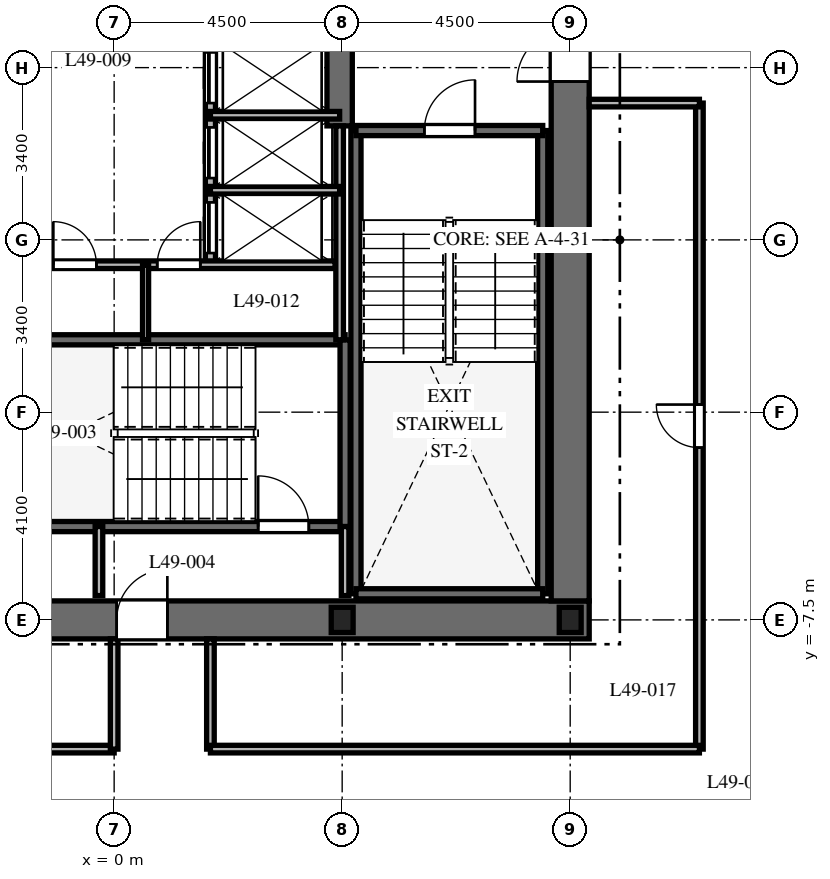
"""IFC4 building model, lengths in metres.
Left out: names, types, materials, properties, quantities, classifications, styles, units other than length and angle.
Written with IfcOpenShell. Run it as: python <this file> out.ifc"""

import sys

from ifc_helpers import new_model, si_unit, direction, frame, frame_2d, origin, origin_2d, place, context, subcontext, project, spatial, rectangle, i_section, extrude, element, fill, save


model = new_model("IFC4")
c1 = context("Model", 3, precision=1e-05, world=origin(), true_north=direction((0.0, 1.0)))
c2 = subcontext(c1, "Body", "Model", "MODEL_VIEW")
j1 = project(units=[si_unit("LENGTHUNIT", "METRE"), si_unit("PLANEANGLEUNIT", "RADIAN")], contexts=[c1])
p1 = place(None, origin())
s1 = spatial("IfcSite", under=j1, at=p1, CompositionType="ELEMENT")
p2 = place(p1, origin())
s2 = spatial("IfcBuilding", under=s1, at=p2, CompositionType="ELEMENT")
p3 = place(p2, frame((0.0, 0.0, 197.8)))
s3 = spatial("IfcBuildingStorey", under=s2, at=p3, CompositionType="ELEMENT", Elevation=197.8)
p4 = place(p3, frame((-9.375, -7.5, 0.0), z_axis=(0.0, 0.0, 1.0), x_axis=(1.0, 0.0, 0.0)))
e1 = element("IfcWall", 1, at=p4, inside=s3, PredefinedType="SHEAR", context=c2, shape_type="SweptSolid", body=[
    extrude(rectangle(XDim=18.75, YDim=0.75, at=frame_2d((9.375, 0.0))), origin(), (0.0, 0.0, 1.0), 3.7),
])
p5 = place(p4, frame((9.425, 0.0, 0.0)))
e2 = element("IfcOpeningElement", 2, at=p5, cuts=e1, PredefinedType="OPENING", context=c2, shape_type="SweptSolid", body=[
    extrude(rectangle(XDim=1.0, YDim=2.15, at=frame_2d((0.5, 1.075))), frame((0.0, 0.385, 0.0), z_axis=(0.0, -1.0, 0.0), x_axis=(1.0, 0.0, 0.0)), (0.0, 0.0, 1.0), 0.77),
])
p6 = place(p3, frame((9.0, -7.125, 0.0), z_axis=(0.0, 0.0, 1.0), x_axis=(0.0, 1.0, 0.0)))
e3 = element("IfcWall", 3, at=p6, inside=s3, PredefinedType="SHEAR", context=c2, shape_type="SweptSolid", body=[
    extrude(rectangle(XDim=14.25, YDim=0.75, at=frame_2d((7.125, 0.0))), origin(), (0.0, 0.0, 1.0), 3.7),
])
p7 = place(p6, frame((10.25, 0.0, 0.0)))
e4 = element("IfcOpeningElement", 4, at=p7, cuts=e3, PredefinedType="OPENING", context=c2, shape_type="SweptSolid", body=[
    extrude(rectangle(XDim=1.05, YDim=2.15, at=frame_2d((0.525, 1.075))), frame((0.0, 0.385, 0.0), z_axis=(0.0, -1.0, 0.0), x_axis=(1.0, 0.0, 0.0)), (0.0, 0.0, 1.0), 0.77),
])
p8 = place(p3, frame((4.45, 2.25, 0.0), z_axis=(0.0, 0.0, 1.0), x_axis=(0.0, 1.0, 0.0)))
e5 = element("IfcWall", 5, at=p8, inside=s3, PredefinedType="SHEAR", context=c2, shape_type="SweptSolid", body=[
    extrude(rectangle(XDim=4.875, YDim=0.5, at=frame_2d((2.438, 0.0))), origin(), (0.0, 0.0, 1.0), 3.7),
])
for number, where, z_axis, x_axis in (
    (6, (4.772, -6.985, 0.0), (0.0, 0.0, 1.0), (0.0, 1.0, 0.0)),
    (7, (8.458, -6.985, 0.0), (0.0, 0.0, 1.0), (0.0, 1.0, 0.0)),
):
    element("IfcWall", number, at=place(p3, frame(where, z_axis=z_axis, x_axis=x_axis)), inside=s3, PredefinedType="SHEAR", context=c2, shape_type="SweptSolid", body=[
        extrude(rectangle(XDim=9.143, YDim=0.2, at=frame_2d((4.572, 0.0))), origin(), (0.0, 0.0, 1.0), 3.7),
    ])
p9 = place(p3, frame((4.772, -6.985, 0.0), z_axis=(0.0, 0.0, 1.0), x_axis=(1.0, 0.0, 0.0)))
e8 = element("IfcWall", 8, at=p9, inside=s3, PredefinedType="SHEAR", context=c2, shape_type="SweptSolid", body=[
    extrude(rectangle(XDim=3.686, YDim=0.2, at=frame_2d((1.843, 0.0))), origin(), (0.0, 0.0, 1.0), 3.7),
])
p10 = place(p3, frame((4.772, 2.158, 0.0), z_axis=(0.0, 0.0, 1.0), x_axis=(1.0, 0.0, 0.0)))
e9 = element("IfcWall", 9, at=p10, inside=s3, PredefinedType="SHEAR", context=c2, shape_type="SweptSolid", body=[
    extrude(rectangle(XDim=3.686, YDim=0.2, at=frame_2d((1.843, 0.0))), origin(), (0.0, 0.0, 1.0), 3.7),
])
p11 = place(p10, frame((1.35, 0.0, 0.0)))
e10 = element("IfcOpeningElement", 10, at=p11, cuts=e9, PredefinedType="OPENING", context=c2, shape_type="SweptSolid", body=[
    extrude(rectangle(XDim=1.0, YDim=2.15, at=frame_2d((0.5, 1.075))), frame((0.0, 0.11, 0.0), z_axis=(0.0, -1.0, 0.0), x_axis=(1.0, 0.0, 0.0)), (0.0, 0.0, 1.0), 0.22),
])
p12 = place(p3, frame((-4.608, -5.658, 0.0), z_axis=(0.0, 0.0, 1.0), x_axis=(1.0, 0.0, 0.0)))
e11 = element("IfcWall", 11, at=p12, inside=s3, PredefinedType="SHEAR", context=c2, shape_type="SweptSolid", body=[
    extrude(rectangle(XDim=9.166, YDim=0.2, at=frame_2d((4.583, 0.0))), origin(), (0.0, 0.0, 1.0), 3.7),
])
p13 = place(p12, frame((7.45, 0.0, 0.0)))
e12 = element("IfcOpeningElement", 12, at=p13, cuts=e11, PredefinedType="OPENING", context=c2, shape_type="SweptSolid", body=[
    extrude(rectangle(XDim=1.0, YDim=2.15, at=frame_2d((0.5, 1.075))), frame((0.0, 0.11, 0.0), z_axis=(0.0, -1.0, 0.0), x_axis=(1.0, 0.0, 0.0)), (0.0, 0.0, 1.0), 0.22),
])
p14 = place(p3, frame((-4.608, -1.972, 0.0), z_axis=(0.0, 0.0, 1.0), x_axis=(1.0, 0.0, 0.0)))
e13 = element("IfcWall", 13, at=p14, inside=s3, PredefinedType="SHEAR", context=c2, shape_type="SweptSolid", body=[
    extrude(rectangle(XDim=9.166, YDim=0.2, at=frame_2d((4.583, 0.0))), origin(), (0.0, 0.0, 1.0), 3.7),
])
p15 = place(p3, frame((4.558, -5.658, 0.0), z_axis=(0.0, 0.0, 1.0), x_axis=(0.0, 1.0, 0.0)))
e14 = element("IfcWall", 14, at=p15, inside=s3, PredefinedType="SHEAR", context=c2, shape_type="SweptSolid", body=[
    extrude(rectangle(XDim=3.686, YDim=0.2, at=frame_2d((1.843, 0.0))), origin(), (0.0, 0.0, 1.0), 3.7),
])
for number, where, z_axis, x_axis in (
    (15, (4.5, -7.5, 0.0), (0.0, 0.0, 1.0), (1.0, 0.0, 0.0)),
    (16, (9.0, -7.5, 0.0), (0.0, 0.0, 1.0), (1.0, 0.0, 0.0)),
):
    element("IfcColumn", number, at=place(p3, frame(where, z_axis=z_axis, x_axis=x_axis)), inside=s3, PredefinedType="COLUMN", context=c2, shape_type="SweptSolid", body=[
        extrude(i_section(OverallWidth=0.432, OverallDepth=0.498, WebThickness=0.056, FlangeThickness=0.089, at=origin_2d()), origin(), (0.0, 0.0, 1.0), 3.7),
    ])
for number, where, z_axis, x_axis in (
    (17, (-0.3, -7.02, 0.0), (0.0, 0.0, 1.0), (0.0, 1.0, 0.0)),
    (18, (4.558, -7.02, 0.0), (0.0, 0.0, 1.0), (0.0, 1.0, 0.0)),
):
    element("IfcWall", number, at=place(p3, frame(where, z_axis=z_axis, x_axis=x_axis)), inside=s3, PredefinedType="PARTITIONING", context=c2, shape_type="SweptSolid", body=[
        extrude(rectangle(XDim=1.362, YDim=0.15, at=frame_2d((0.681, 0.0))), origin(), (0.0, 0.0, 1.0), 3.35),
    ])
p16 = place(p3, frame((4.45, -1.972, 0.0), z_axis=(0.0, 0.0, 1.0), x_axis=(0.0, 1.0, 0.0)))
e19 = element("IfcWall", 19, at=p16, inside=s3, PredefinedType="PARTITIONING", context=c2, shape_type="SweptSolid", body=[
    extrude(rectangle(XDim=4.222, YDim=0.15, at=frame_2d((2.111, 0.0))), origin(), (0.0, 0.0, 1.0), 3.35),
])
p17 = place(p3, frame((1.9, -0.5, 0.0), z_axis=(0.0, 0.0, 1.0), x_axis=(0.0, 1.0, 0.0)))
e20 = element("IfcWall", 20, at=p17, inside=s3, PredefinedType="PARTITIONING", context=c2, shape_type="SweptSolid", body=[
    extrude(rectangle(XDim=4.44, YDim=0.2, at=frame_2d((2.22, 0.0))), origin(), (0.0, 0.0, 1.0), 3.35),
])
p18 = place(p17, frame((0.24, 0.0, 0.0)))
e21 = element("IfcOpeningElement", 21, at=p18, cuts=e20, PredefinedType="OPENING", context=c2, shape_type="SweptSolid", body=[
    extrude(rectangle(XDim=1.0, YDim=2.2, at=frame_2d((0.5, 1.1))), frame((0.0, 0.11, 0.0), z_axis=(0.0, -1.0, 0.0), x_axis=(1.0, 0.0, 0.0)), (0.0, 0.0, 1.0), 0.22),
])
p19 = place(p17, frame((1.72, 0.0, 0.0)))
e22 = element("IfcOpeningElement", 22, at=p19, cuts=e20, PredefinedType="OPENING", context=c2, shape_type="SweptSolid", body=[
    extrude(rectangle(XDim=1.0, YDim=2.2, at=frame_2d((0.5, 1.1))), frame((0.0, 0.11, 0.0), z_axis=(0.0, -1.0, 0.0), x_axis=(1.0, 0.0, 0.0)), (0.0, 0.0, 1.0), 0.22),
])
p20 = place(p17, frame((3.2, 0.0, 0.0)))
e23 = element("IfcOpeningElement", 23, at=p20, cuts=e20, PredefinedType="OPENING", context=c2, shape_type="SweptSolid", body=[
    extrude(rectangle(XDim=1.0, YDim=2.2, at=frame_2d((0.5, 1.1))), frame((0.0, 0.11, 0.0), z_axis=(0.0, -1.0, 0.0), x_axis=(1.0, 0.0, 0.0)), (0.0, 0.0, 1.0), 0.22),
])
for number, where, z_axis, x_axis in (
    (24, (1.9, 0.98, 0.0), (0.0, 0.0, 1.0), (1.0, 0.0, 0.0)),
    (25, (1.9, 2.46, 0.0), (0.0, 0.0, 1.0), (1.0, 0.0, 0.0)),
):
    element("IfcWall", number, at=place(p3, frame(where, z_axis=z_axis, x_axis=x_axis)), inside=s3, PredefinedType="PARTITIONING", context=c2, shape_type="SweptSolid", body=[
        extrude(rectangle(XDim=2.55, YDim=0.15, at=frame_2d((1.275, 0.0))), origin(), (0.0, 0.0, 1.0), 3.35),
    ])
p21 = place(p3, frame((-4.36, -0.49, 0.0), z_axis=(0.0, 0.0, 1.0), x_axis=(1.0, 0.0, 0.0)))
e26 = element("IfcWall", 26, at=p21, inside=s3, PredefinedType="PARTITIONING", context=c2, shape_type="SweptSolid", body=[
    extrude(rectangle(XDim=8.72, YDim=0.15, at=frame_2d((4.36, 0.0))), origin(), (0.0, 0.0, 1.0), 3.35),
])
p22 = place(p21, frame((3.16, 0.0, 0.0)))
e27 = element("IfcOpeningElement", 27, at=p22, cuts=e26, PredefinedType="OPENING", context=c2, shape_type="SweptSolid", body=[
    extrude(rectangle(XDim=0.85, YDim=2.03, at=frame_2d((0.425, 1.015))), frame((0.0, 0.085, 0.0), z_axis=(0.0, -1.0, 0.0), x_axis=(1.0, 0.0, 0.0)), (0.0, 0.0, 1.0), 0.17),
])
p23 = place(p21, frame((5.21, 0.0, 0.0)))
e28 = element("IfcOpeningElement", 28, at=p23, cuts=e26, PredefinedType="OPENING", context=c2, shape_type="SweptSolid", body=[
    extrude(rectangle(XDim=0.85, YDim=2.03, at=frame_2d((0.425, 1.015))), frame((0.0, 0.085, 0.0), z_axis=(0.0, -1.0, 0.0), x_axis=(1.0, 0.0, 0.0)), (0.0, 0.0, 1.0), 0.17),
])
p24 = place(p3, frame((0.62, -1.972, 0.0), z_axis=(0.0, 0.0, 1.0), x_axis=(0.0, 1.0, 0.0)))
e29 = element("IfcWall", 29, at=p24, inside=s3, PredefinedType="PARTITIONING", context=c2, shape_type="SweptSolid", body=[
    extrude(rectangle(XDim=1.472, YDim=0.12, at=frame_2d((0.736, 0.0))), origin(), (0.0, 0.0, 1.0), 3.35),
])
p25 = place(p3, frame((11.55, -10.05, 0.0), z_axis=(0.0, 0.0, 1.0), x_axis=(0.0, 1.0, 0.0)))
e30 = element("IfcWall", 30, at=p25, inside=s3, PredefinedType="PARTITIONING", context=c2, shape_type="SweptSolid", body=[
    extrude(rectangle(XDim=12.75, YDim=0.15, at=frame_2d((6.375, 0.0))), origin(), (0.0, 0.0, 1.0), 2.79),
])
p26 = place(p25, frame((5.95, 0.0, 0.0)))
e31 = element("IfcOpeningElement", 31, at=p26, cuts=e30, PredefinedType="OPENING", context=c2, shape_type="SweptSolid", body=[
    extrude(rectangle(XDim=0.85, YDim=2.03, at=frame_2d((0.425, 1.015))), frame((0.0, 0.085, 0.0), z_axis=(0.0, -1.0, 0.0), x_axis=(1.0, 0.0, 0.0)), (0.0, 0.0, 1.0), 0.17),
])
p27 = place(p3, frame((11.55, 2.7, 0.0), z_axis=(0.0, 0.0, 1.0), x_axis=(-1.0, 0.0, 0.0)))
e32 = element("IfcWall", 32, at=p27, inside=s3, PredefinedType="PARTITIONING", context=c2, shape_type="SweptSolid", body=[
    extrude(rectangle(XDim=2.175, YDim=0.15, at=frame_2d((1.087, 0.0))), origin(), (0.0, 0.0, 1.0), 3.35),
])
p28 = place(p3, frame((-11.55, -10.05, 0.0), z_axis=(0.0, 0.0, 1.0), x_axis=(1.0, 0.0, 0.0)))
e33 = element("IfcWall", 33, at=p28, inside=s3, PredefinedType="PARTITIONING", context=c2, shape_type="SweptSolid", body=[
    extrude(rectangle(XDim=11.55, YDim=0.15, at=frame_2d((5.775, 0.0))), origin(), (0.0, 0.0, 1.0), 2.14),
])
for number, where, z_axis, x_axis in (
    (34, (0.0, -10.05, 0.0), (0.0, 0.0, 1.0), (0.0, 1.0, 0.0)),
    (35, (1.9, -7.875, 0.0), (0.0, 0.0, 1.0), (0.0, -1.0, 0.0)),
):
    element("IfcWall", number, at=place(p3, frame(where, z_axis=z_axis, x_axis=x_axis)), inside=s3, PredefinedType="PARTITIONING", context=c2, shape_type="SweptSolid", body=[
        extrude(rectangle(XDim=2.175, YDim=0.15, at=frame_2d((1.087, 0.0))), origin(), (0.0, 0.0, 1.0), 3.35),
    ])
p29 = place(p3, frame((1.9, -10.05, 0.0), z_axis=(0.0, 0.0, 1.0), x_axis=(1.0, 0.0, 0.0)))
e36 = element("IfcWall", 36, at=p29, inside=s3, PredefinedType="PARTITIONING", context=c2, shape_type="SweptSolid", body=[
    extrude(rectangle(XDim=9.65, YDim=0.15, at=frame_2d((4.825, 0.0))), origin(), (0.0, 0.0, 1.0), 2.14),
])
p30 = place(p11, origin())
e37 = element("IfcDoor", 37, at=p30, inside=s3, OperationType="SINGLE_SWING_RIGHT", PredefinedType="DOOR", context=c2, shape_type="SweptSolid", body=[
    extrude(rectangle(XDim=1.0, YDim=2.15, at=frame_2d((0.5, 1.075))), frame((0.0, 0.025, 0.0), z_axis=(0.0, -1.0, 0.0), x_axis=(1.0, 0.0, 0.0)), (0.0, 0.0, 1.0), 0.05),
])
fill(e10, e37)
p31 = place(p13, origin())
e38 = element("IfcDoor", 38, at=p31, inside=s3, OperationType="SINGLE_SWING_LEFT", PredefinedType="DOOR", context=c2, shape_type="SweptSolid", body=[
    extrude(rectangle(XDim=1.0, YDim=2.15, at=frame_2d((0.5, 1.075))), frame((0.0, 0.025, 0.0), z_axis=(0.0, -1.0, 0.0), x_axis=(1.0, 0.0, 0.0)), (0.0, 0.0, 1.0), 0.05),
])
fill(e12, e38)
p32 = place(p5, origin())
e39 = element("IfcDoor", 39, at=p32, inside=s3, OperationType="SINGLE_SWING_RIGHT", PredefinedType="DOOR", context=c2, shape_type="SweptSolid", body=[
    extrude(rectangle(XDim=1.0, YDim=2.15, at=frame_2d((0.5, 1.075))), frame((0.0, 0.025, 0.0), z_axis=(0.0, -1.0, 0.0), x_axis=(1.0, 0.0, 0.0)), (0.0, 0.0, 1.0), 0.05),
])
fill(e2, e39)
p33 = place(p7, origin())
e40 = element("IfcDoor", 40, at=p33, inside=s3, OperationType="SINGLE_SWING_LEFT", PredefinedType="DOOR", context=c2, shape_type="SweptSolid", body=[
    extrude(rectangle(XDim=1.05, YDim=2.15, at=frame_2d((0.525, 1.075))), frame((0.0, 0.025, 0.0), z_axis=(0.0, -1.0, 0.0), x_axis=(1.0, 0.0, 0.0)), (0.0, 0.0, 1.0), 0.05),
])
fill(e4, e40)
p34 = place(p18, origin())
e41 = element("IfcDoor", 41, at=p34, inside=s3, OperationType="SLIDING_TO_RIGHT", PredefinedType="DOOR", context=c2, shape_type="SweptSolid", body=[
    extrude(rectangle(XDim=1.0, YDim=2.2, at=frame_2d((0.5, 1.1))), frame((0.0, 0.025, 0.0), z_axis=(0.0, -1.0, 0.0), x_axis=(1.0, 0.0, 0.0)), (0.0, 0.0, 1.0), 0.05),
])
fill(e21, e41)
p35 = place(p19, origin())
e42 = element("IfcDoor", 42, at=p35, inside=s3, OperationType="SLIDING_TO_RIGHT", PredefinedType="DOOR", context=c2, shape_type="SweptSolid", body=[
    extrude(rectangle(XDim=1.0, YDim=2.2, at=frame_2d((0.5, 1.1))), frame((0.0, 0.025, 0.0), z_axis=(0.0, -1.0, 0.0), x_axis=(1.0, 0.0, 0.0)), (0.0, 0.0, 1.0), 0.05),
])
fill(e22, e42)
p36 = place(p20, origin())
e43 = element("IfcDoor", 43, at=p36, inside=s3, OperationType="SLIDING_TO_RIGHT", PredefinedType="DOOR", context=c2, shape_type="SweptSolid", body=[
    extrude(rectangle(XDim=1.0, YDim=2.2, at=frame_2d((0.5, 1.1))), frame((0.0, 0.025, 0.0), z_axis=(0.0, -1.0, 0.0), x_axis=(1.0, 0.0, 0.0)), (0.0, 0.0, 1.0), 0.05),
])
fill(e23, e43)
p37 = place(p22, origin())
e44 = element("IfcDoor", 44, at=p37, inside=s3, OperationType="SINGLE_SWING_LEFT", PredefinedType="DOOR", context=c2, shape_type="SweptSolid", body=[
    extrude(rectangle(XDim=0.85, YDim=2.03, at=frame_2d((0.425, 1.015))), frame((0.0, 0.025, 0.0), z_axis=(0.0, -1.0, 0.0), x_axis=(1.0, 0.0, 0.0)), (0.0, 0.0, 1.0), 0.05),
])
fill(e27, e44)
p38 = place(p23, origin())
e45 = element("IfcDoor", 45, at=p38, inside=s3, OperationType="SINGLE_SWING_RIGHT", PredefinedType="DOOR", context=c2, shape_type="SweptSolid", body=[
    extrude(rectangle(XDim=0.85, YDim=2.03, at=frame_2d((0.425, 1.015))), frame((0.0, 0.025, 0.0), z_axis=(0.0, -1.0, 0.0), x_axis=(1.0, 0.0, 0.0)), (0.0, 0.0, 1.0), 0.05),
])
fill(e28, e45)
p39 = place(p26, origin())
e46 = element("IfcDoor", 46, at=p39, inside=s3, OperationType="SINGLE_SWING_RIGHT", PredefinedType="DOOR", context=c2, shape_type="SweptSolid", body=[
    extrude(rectangle(XDim=0.85, YDim=2.03, at=frame_2d((0.425, 1.015))), frame((0.0, 0.025, 0.0), z_axis=(0.0, -1.0, 0.0), x_axis=(1.0, 0.0, 0.0)), (0.0, 0.0, 1.0), 0.05),
])
fill(e31, e46)
save(model, sys.argv[1])
